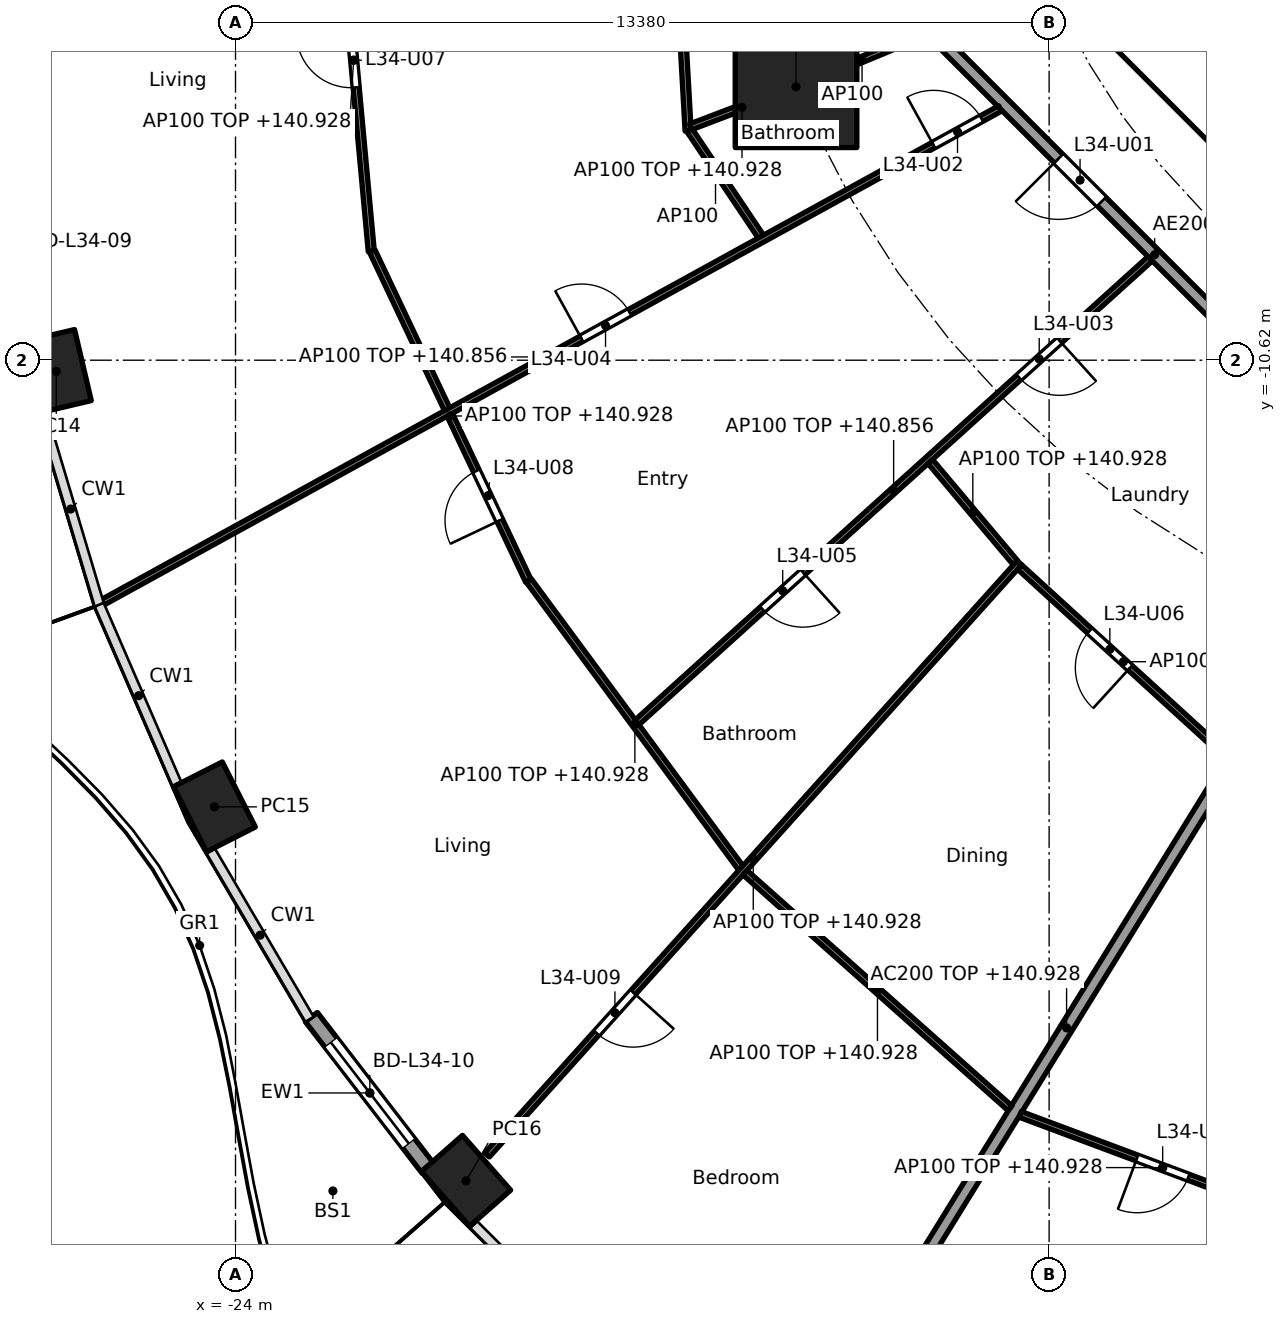
"""IFC4 building model, lengths in metres.
Left out: names, types, materials, properties, quantities, classifications, styles, units other than length and angle.
Written with IfcOpenShell. Run it as: python <this file> out.ifc"""

import sys

from ifc_helpers import new_model, si_unit, direction, frame, frame_2d, origin, origin_2d, place, context, subcontext, project, spatial, rectangle, hollow_rectangle, extrude, element, fill, save


model = new_model("IFC4")
c1 = context("Model", 3, precision=1e-05, world=origin(), true_north=direction((0.0, 1.0)))
c2 = subcontext(c1, "Body", "Model", "MODEL_VIEW")
j1 = project(units=[si_unit("LENGTHUNIT", "METRE"), si_unit("PLANEANGLEUNIT", "RADIAN")], contexts=[c1])
p1 = place(None, origin())
s1 = spatial("IfcSite", under=j1, at=p1, CompositionType="ELEMENT")
p2 = place(p1, origin())
s2 = spatial("IfcBuilding", under=s1, at=p2, CompositionType="ELEMENT")
p3 = place(p2, frame((0.0, 0.0, 138.1)))
s3 = spatial("IfcBuildingStorey", under=s2, at=p3, CompositionType="ELEMENT", Elevation=138.1)
for number, where, z_axis, x_axis in (
    (1, (-26.948, -10.803, 0.0), (0.0, 0.0, 1.0), (0.229, -0.973, 0.0)),
    (2, (-24.347, -17.965, 0.0), (0.0, 0.0, 1.0), (0.452, -0.892, 0.0)),
    (3, (-20.209, -24.115, 0.0), (0.0, 0.0, 1.0), (0.66, -0.751, 0.0)),
):
    element("IfcColumn", number, at=place(p3, frame(where, z_axis=z_axis, x_axis=x_axis)), inside=s3, PredefinedType="COLUMN", context=c2, shape_type="SweptSolid", body=[
        extrude(hollow_rectangle(XDim=1.2, YDim=0.9, WallThickness=0.04, at=origin_2d()), origin(), (0.0, 0.0, 1.0), 3.7),
    ])
p4 = place(p3, frame((-14.782, -6.123, 0.0), z_axis=(0.0, 0.0, 1.0), x_axis=(1.0, 0.0, 0.0)))
e4 = element("IfcColumn", 4, at=p4, inside=s3, PredefinedType="COLUMN", context=c2, shape_type="SweptSolid", body=[
    extrude(rectangle(XDim=2.0, YDim=2.0, at=origin_2d()), origin(), (0.0, 0.0, 1.0), 3.7),
])
p5 = place(p3, frame((-20.83, -23.917, 0.0), z_axis=(0.0, 0.0, 1.0), x_axis=(-0.610429847179, 0.792070326217, 0.0)))
e5 = element("IfcWall", 5, at=p5, inside=s3, PredefinedType="SOLIDWALL", context=c2, shape_type="SweptSolid", body=[
    extrude(rectangle(XDim=3.149, YDim=0.25, at=frame_2d((1.575, 0.0))), origin(), (0.0, 0.0, 1.0), 3.44),
])
p6 = place(p5, frame((0.525, 0.0, 0.0)))
e6 = element("IfcOpeningElement", 6, at=p6, cuts=e5, PredefinedType="OPENING", context=c2, shape_type="SweptSolid", body=[
    extrude(rectangle(XDim=2.1, YDim=2.4, at=frame_2d((1.05, 1.2))), frame((0.0, 0.135, 0.0), z_axis=(0.0, -1.0, 0.0), x_axis=(1.0, 0.0, 0.0)), (0.0, 0.0, 1.0), 0.27),
])
p7 = place(p3, frame((-9.988, -4.613, 0.0), z_axis=(0.0, 0.0, 1.0), x_axis=(0.707106781187, -0.707106781187, 0.0)))
e7 = element("IfcWall", 7, at=p7, inside=s3, PredefinedType="SHEAR", context=c2, shape_type="SweptSolid", body=[
    extrude(rectangle(XDim=7.602, YDim=0.6, at=frame_2d((3.801, 0.0))), origin(), (0.0, 0.0, 1.0), 3.44),
])
p8 = place(p7, frame((6.151, 0.0, 0.0)))
e8 = element("IfcOpeningElement", 8, at=p8, cuts=e7, PredefinedType="OPENING", context=c2, shape_type="SweptSolid", body=[
    extrude(rectangle(XDim=1.1, YDim=2.1, at=frame_2d((0.55, 1.05))), frame((0.0, 0.31, 0.0), z_axis=(0.0, -1.0, 0.0), x_axis=(1.0, 0.0, 0.0)), (0.0, 0.0, 1.0), 0.62),
])
p9 = place(p3, frame((-6.149, -14.825, 0.0), z_axis=(0.0, 0.0, 1.0), x_axis=(-0.525406383516, -0.85085141603, 0.0)))
e9 = element("IfcWall", 9, at=p9, inside=s3, PredefinedType="PARTITIONING", context=c2, shape_type="SweptSolid", body=[
    extrude(rectangle(XDim=15.925, YDim=0.2, at=frame_2d((7.962, 0.0))), origin(), (0.0, 0.0, 1.0), 2.828),
])
p10 = place(p3, frame((-12.635, -5.134, 0.0), z_axis=(0.0, 0.0, 1.0), x_axis=(0.707106781187, -0.707106781187, 0.0)))
e10 = element("IfcWall", 10, at=p10, inside=s3, PredefinedType="PARTITIONING", context=c2, shape_type="SweptSolid", body=[
    extrude(rectangle(XDim=10.609, YDim=0.2, at=frame_2d((5.305, 0.0))), origin(), (0.0, 0.0, 1.0), 3.44),
])
p11 = place(p10, frame((3.07, 0.0, 0.0)))
e11 = element("IfcOpeningElement", 11, at=p11, cuts=e10, PredefinedType="OPENING", context=c2, shape_type="SweptSolid", body=[
    extrude(rectangle(XDim=1.0, YDim=2.1, at=frame_2d((0.5, 1.05))), frame((0.0, 0.11, 0.0), z_axis=(0.0, -1.0, 0.0), x_axis=(1.0, 0.0, 0.0)), (0.0, 0.0, 1.0), 0.22),
])
p12 = place(p3, frame((-16.825, -2.058, 0.0), z_axis=(0.0, 0.0, 1.0), x_axis=(0.055971643802, -0.998432358796, 0.0)))
e12 = element("IfcWall", 12, at=p12, inside=s3, PredefinedType="PARTITIONING", context=c2, shape_type="SweptSolid", body=[
    extrude(rectangle(XDim=4.798, YDim=0.1, at=frame_2d((2.399, 0.0))), origin(), (0.0, 0.0, 1.0), 2.828),
])
p13 = place(p3, frame((-22.347, -2.542, 0.0), z_axis=(0.0, 0.0, 1.0), x_axis=(0.091783634244, -0.995778973711, 0.0)))
e13 = element("IfcWall", 13, at=p13, inside=s3, PredefinedType="PARTITIONING", context=c2, shape_type="SweptSolid", body=[
    extrude(rectangle(XDim=6.315, YDim=0.1, at=frame_2d((3.157, 0.0))), origin(), (0.0, 0.0, 1.0), 2.828),
])
p14 = place(p13, frame((2.708, 0.0, 0.0)))
e14 = element("IfcOpeningElement", 14, at=p14, cuts=e13, PredefinedType="OPENING", context=c2, shape_type="SweptSolid", body=[
    extrude(rectangle(XDim=0.9, YDim=2.1, at=frame_2d((0.45, 1.05))), frame((0.0, 0.06, 0.0), z_axis=(0.0, -1.0, 0.0), x_axis=(1.0, 0.0, 0.0)), (0.0, 0.0, 1.0), 0.12),
])
p15 = place(p3, frame((-12.657, -5.243, 0.0), z_axis=(0.0, 0.0, 1.0), x_axis=(-0.923864733477, -0.382719158442, 0.0)))
e15 = element("IfcWall", 15, at=p15, inside=s3, PredefinedType="PARTITIONING", context=c2, shape_type="SweptSolid", body=[
    extrude(rectangle(XDim=2.25, YDim=0.1, at=frame_2d((1.125, 0.0))), origin(), (0.0, 0.0, 1.0), 3.44),
])
p16 = place(p3, frame((-14.829, -6.141, 0.0), z_axis=(0.0, 0.0, 1.0), x_axis=(-0.934704367514, -0.355426146128, 0.0)))
e16 = element("IfcWall", 16, at=p16, inside=s3, PredefinedType="PARTITIONING", context=c2, shape_type="SweptSolid", body=[
    extrude(rectangle(XDim=1.802, YDim=0.1, at=frame_2d((0.901, 0.0))), origin(), (0.0, 0.0, 1.0), 2.828),
])
p17 = place(p3, frame((-16.532, -6.84, 0.0), z_axis=(0.0, 0.0, 1.0), x_axis=(0.556994773624, -0.830515997531, 0.0)))
e17 = element("IfcWall", 17, at=p17, inside=s3, PredefinedType="PARTITIONING", context=c2, shape_type="SweptSolid", body=[
    extrude(rectangle(XDim=2.183, YDim=0.1, at=frame_2d((1.092, 0.0))), origin(), (0.0, 0.0, 1.0), 3.44),
])
p18 = place(p3, frame((-21.75, -8.826, 0.0), z_axis=(0.0, 0.0, 1.0), x_axis=(0.427736419988, -0.903903509793, 0.0)))
e18 = element("IfcWall", 18, at=p18, inside=s3, PredefinedType="PARTITIONING", context=c2, shape_type="SweptSolid", body=[
    extrude(rectangle(XDim=5.999, YDim=0.1, at=frame_2d((3.0, 0.0))), origin(), (0.0, 0.0, 1.0), 2.828),
])
p19 = place(p18, frame((3.999, 0.0, 0.0)))
e19 = element("IfcOpeningElement", 19, at=p19, cuts=e18, PredefinedType="OPENING", context=c2, shape_type="SweptSolid", body=[
    extrude(rectangle(XDim=0.9, YDim=2.1, at=frame_2d((0.45, 1.05))), frame((0.0, 0.06, 0.0), z_axis=(0.0, -1.0, 0.0), x_axis=(1.0, 0.0, 0.0)), (0.0, 0.0, 1.0), 0.12),
])
p20 = place(p3, frame((-11.426, -6.479, 0.0), z_axis=(0.0, 0.0, 1.0), x_axis=(-0.876110392495, -0.482110547657, 0.0)))
e20 = element("IfcWall", 20, at=p20, inside=s3, PredefinedType="PARTITIONING", context=c2, shape_type="SweptSolid", body=[
    extrude(rectangle(XDim=16.955, YDim=0.1, at=frame_2d((8.478, 0.0))), origin(), (0.0, 0.0, 1.0), 2.756),
])
p21 = place(p20, frame((0.35, 0.0, 0.0)))
e21 = element("IfcOpeningElement", 21, at=p21, cuts=e20, PredefinedType="OPENING", context=c2, shape_type="SweptSolid", body=[
    extrude(rectangle(XDim=0.9, YDim=2.1, at=frame_2d((0.45, 1.05))), frame((0.0, 0.06, 0.0), z_axis=(0.0, -1.0, 0.0), x_axis=(1.0, 0.0, 0.0)), (0.0, 0.0, 1.0), 0.12),
])
p22 = place(p20, frame((6.957, 0.0, 0.0)))
e22 = element("IfcOpeningElement", 22, at=p22, cuts=e20, PredefinedType="OPENING", context=c2, shape_type="SweptSolid", body=[
    extrude(rectangle(XDim=0.9, YDim=2.1, at=frame_2d((0.45, 1.05))), frame((0.0, 0.06, 0.0), z_axis=(0.0, -1.0, 0.0), x_axis=(1.0, 0.0, 0.0)), (0.0, 0.0, 1.0), 0.12),
])
p23 = place(p3, frame((-19.176, -14.244, 0.0), z_axis=(0.0, 0.0, 1.0), x_axis=(0.593532053206, -0.80481035146, 0.0)))
e23 = element("IfcWall", 23, at=p23, inside=s3, PredefinedType="PARTITIONING", context=c2, shape_type="SweptSolid", body=[
    extrude(rectangle(XDim=5.876, YDim=0.1, at=frame_2d((2.938, 0.0))), origin(), (0.0, 0.0, 1.0), 2.828),
])
p24 = place(p3, frame((-8.959, -8.952, 0.0), z_axis=(0.0, 0.0, 1.0), x_axis=(-0.741982736283, -0.670418987692, 0.0)))
e24 = element("IfcWall", 24, at=p24, inside=s3, PredefinedType="PARTITIONING", context=c2, shape_type="SweptSolid", body=[
    extrude(rectangle(XDim=11.371, YDim=0.1, at=frame_2d((5.685, 0.0))), origin(), (0.0, 0.0, 1.0), 2.756),
])
p25 = place(p24, frame((2.009, 0.0, 0.0)))
e25 = element("IfcOpeningElement", 25, at=p25, cuts=e24, PredefinedType="OPENING", context=c2, shape_type="SweptSolid", body=[
    extrude(rectangle(XDim=0.9, YDim=2.1, at=frame_2d((0.45, 1.05))), frame((0.0, 0.06, 0.0), z_axis=(0.0, -1.0, 0.0), x_axis=(1.0, 0.0, 0.0)), (0.0, 0.0, 1.0), 0.12),
])
p26 = place(p24, frame((7.694, 0.0, 0.0)))
e26 = element("IfcOpeningElement", 26, at=p26, cuts=e24, PredefinedType="OPENING", context=c2, shape_type="SweptSolid", body=[
    extrude(rectangle(XDim=0.9, YDim=2.1, at=frame_2d((0.45, 1.05))), frame((0.0, 0.06, 0.0), z_axis=(0.0, -1.0, 0.0), x_axis=(1.0, 0.0, 0.0)), (0.0, 0.0, 1.0), 0.12),
])
p27 = place(p3, frame((-12.575, -12.286, 0.0), z_axis=(0.0, 0.0, 1.0), x_axis=(0.644052758448, -0.764981074495, 0.0)))
e27 = element("IfcWall", 27, at=p27, inside=s3, PredefinedType="PARTITIONING", context=c2, shape_type="SweptSolid", body=[
    extrude(rectangle(XDim=2.174, YDim=0.1, at=frame_2d((1.087, 0.0))), origin(), (0.0, 0.0, 1.0), 2.828),
])
p28 = place(p3, frame((-11.109, -13.951, 0.0), z_axis=(0.0, 0.0, 1.0), x_axis=(-0.668488676691, -0.743722319913, 0.0)))
e28 = element("IfcWall", 28, at=p28, inside=s3, PredefinedType="PARTITIONING", context=c2, shape_type="SweptSolid", body=[
    extrude(rectangle(XDim=13.094, YDim=0.1, at=frame_2d((6.547, 0.0))), origin(), (0.0, 0.0, 1.0), 2.828),
])
p29 = place(p28, frame((9.5, 0.0, 0.0)))
e29 = element("IfcOpeningElement", 29, at=p29, cuts=e28, PredefinedType="OPENING", context=c2, shape_type="SweptSolid", body=[
    extrude(rectangle(XDim=0.9, YDim=2.1, at=frame_2d((0.45, 1.05))), frame((0.0, 0.06, 0.0), z_axis=(0.0, -1.0, 0.0), x_axis=(1.0, 0.0, 0.0)), (0.0, 0.0, 1.0), 0.12),
])
p30 = place(p3, frame((-11.105, -14.021, 0.0), z_axis=(0.0, 0.0, 1.0), x_axis=(0.738880014758, -0.673837015747, 0.0)))
e30 = element("IfcWall", 30, at=p30, inside=s3, PredefinedType="PARTITIONING", context=c2, shape_type="SweptSolid", body=[
    extrude(rectangle(XDim=4.621, YDim=0.1, at=frame_2d((2.31, 0.0))), origin(), (0.0, 0.0, 1.0), 2.828),
])
p31 = place(p30, frame((1.558, 0.0, 0.0)))
e31 = element("IfcOpeningElement", 31, at=p31, cuts=e30, PredefinedType="OPENING", context=c2, shape_type="SweptSolid", body=[
    extrude(rectangle(XDim=0.9, YDim=2.1, at=frame_2d((0.45, 1.05))), frame((0.0, 0.06, 0.0), z_axis=(0.0, -1.0, 0.0), x_axis=(1.0, 0.0, 0.0)), (0.0, 0.0, 1.0), 0.12),
])
p32 = place(p3, frame((-15.622, -19.046, 0.0), z_axis=(0.0, 0.0, 1.0), x_axis=(0.747342322463, -0.664439201925, 0.0)))
e32 = element("IfcWall", 32, at=p32, inside=s3, PredefinedType="PARTITIONING", context=c2, shape_type="SweptSolid", body=[
    extrude(rectangle(XDim=5.831, YDim=0.1, at=frame_2d((2.916, 0.0))), origin(), (0.0, 0.0, 1.0), 2.828),
])
p33 = place(p3, frame((-11.096, -23.022, 0.0), z_axis=(0.0, 0.0, 1.0), x_axis=(0.936725688471, -0.350064257758, 0.0)))
e33 = element("IfcWall", 33, at=p33, inside=s3, PredefinedType="PARTITIONING", context=c2, shape_type="SweptSolid", body=[
    extrude(rectangle(XDim=5.003, YDim=0.1, at=frame_2d((2.501, 0.0))), origin(), (0.0, 0.0, 1.0), 2.828),
])
p34 = place(p33, frame((2.051, 0.0, 0.0)))
e34 = element("IfcOpeningElement", 34, at=p34, cuts=e33, PredefinedType="OPENING", context=c2, shape_type="SweptSolid", body=[
    extrude(rectangle(XDim=0.9, YDim=2.1, at=frame_2d((0.45, 1.05))), frame((0.0, 0.06, 0.0), z_axis=(0.0, -1.0, 0.0), x_axis=(1.0, 0.0, 0.0)), (0.0, 0.0, 1.0), 0.12),
])
p35 = place(p6, origin())
e35 = element("IfcDoor", 35, at=p35, inside=s3, OperationType="SLIDING_TO_LEFT", PredefinedType="DOOR", context=c2, shape_type="SweptSolid", body=[
    extrude(rectangle(XDim=2.1, YDim=2.4, at=frame_2d((1.05, 1.2))), frame((0.0, 0.025, 0.0), z_axis=(0.0, -1.0, 0.0), x_axis=(1.0, 0.0, 0.0)), (0.0, 0.0, 1.0), 0.05),
])
fill(e6, e35)
p36 = place(p11, frame((1.0, 0.0, 0.0), x_axis=(-1.0, 0.0, 0.0)))
e36 = element("IfcDoor", 36, at=p36, inside=s3, OperationType="SINGLE_SWING_RIGHT", PredefinedType="DOOR", context=c2, shape_type="SweptSolid", body=[
    extrude(rectangle(XDim=1.0, YDim=2.1, at=frame_2d((0.5, 1.05))), frame((0.0, 0.025, 0.0), z_axis=(0.0, -1.0, 0.0), x_axis=(1.0, 0.0, 0.0)), (0.0, 0.0, 1.0), 0.05),
])
fill(e11, e36)
p37 = place(p21, frame((0.9, 0.0, 0.0), x_axis=(-1.0, 0.0, 0.0)))
e37 = element("IfcDoor", 37, at=p37, inside=s3, OperationType="SINGLE_SWING_LEFT", PredefinedType="DOOR", context=c2, shape_type="SweptSolid", body=[
    extrude(rectangle(XDim=0.9, YDim=2.1, at=frame_2d((0.45, 1.05))), frame((0.0, 0.025, 0.0), z_axis=(0.0, -1.0, 0.0), x_axis=(1.0, 0.0, 0.0)), (0.0, 0.0, 1.0), 0.05),
])
fill(e21, e37)
p38 = place(p25, origin())
e38 = element("IfcDoor", 38, at=p38, inside=s3, OperationType="SINGLE_SWING_LEFT", PredefinedType="DOOR", context=c2, shape_type="SweptSolid", body=[
    extrude(rectangle(XDim=0.9, YDim=2.1, at=frame_2d((0.45, 1.05))), frame((0.0, 0.025, 0.0), z_axis=(0.0, -1.0, 0.0), x_axis=(1.0, 0.0, 0.0)), (0.0, 0.0, 1.0), 0.05),
])
fill(e25, e38)
p39 = place(p22, frame((0.9, 0.0, 0.0), x_axis=(-1.0, 0.0, 0.0)))
e39 = element("IfcDoor", 39, at=p39, inside=s3, OperationType="SINGLE_SWING_LEFT", PredefinedType="DOOR", context=c2, shape_type="SweptSolid", body=[
    extrude(rectangle(XDim=0.9, YDim=2.1, at=frame_2d((0.45, 1.05))), frame((0.0, 0.025, 0.0), z_axis=(0.0, -1.0, 0.0), x_axis=(1.0, 0.0, 0.0)), (0.0, 0.0, 1.0), 0.05),
])
fill(e22, e39)
p40 = place(p26, origin())
e40 = element("IfcDoor", 40, at=p40, inside=s3, OperationType="SINGLE_SWING_LEFT", PredefinedType="DOOR", context=c2, shape_type="SweptSolid", body=[
    extrude(rectangle(XDim=0.9, YDim=2.1, at=frame_2d((0.45, 1.05))), frame((0.0, 0.025, 0.0), z_axis=(0.0, -1.0, 0.0), x_axis=(1.0, 0.0, 0.0)), (0.0, 0.0, 1.0), 0.05),
])
fill(e26, e40)
p41 = place(p31, frame((0.9, 0.0, 0.0), x_axis=(-1.0, 0.0, 0.0)))
e41 = element("IfcDoor", 41, at=p41, inside=s3, OperationType="SINGLE_SWING_LEFT", PredefinedType="DOOR", context=c2, shape_type="SweptSolid", body=[
    extrude(rectangle(XDim=0.9, YDim=2.1, at=frame_2d((0.45, 1.05))), frame((0.0, 0.025, 0.0), z_axis=(0.0, -1.0, 0.0), x_axis=(1.0, 0.0, 0.0)), (0.0, 0.0, 1.0), 0.05),
])
fill(e31, e41)
p42 = place(p14, frame((0.9, 0.0, 0.0), x_axis=(-1.0, 0.0, 0.0)))
e42 = element("IfcDoor", 42, at=p42, inside=s3, OperationType="SINGLE_SWING_RIGHT", PredefinedType="DOOR", context=c2, shape_type="SweptSolid", body=[
    extrude(rectangle(XDim=0.9, YDim=2.1, at=frame_2d((0.45, 1.05))), frame((0.0, 0.025, 0.0), z_axis=(0.0, -1.0, 0.0), x_axis=(1.0, 0.0, 0.0)), (0.0, 0.0, 1.0), 0.05),
])
fill(e14, e42)
p43 = place(p19, frame((0.9, 0.0, 0.0), x_axis=(-1.0, 0.0, 0.0)))
e43 = element("IfcDoor", 43, at=p43, inside=s3, OperationType="SINGLE_SWING_LEFT", PredefinedType="DOOR", context=c2, shape_type="SweptSolid", body=[
    extrude(rectangle(XDim=0.9, YDim=2.1, at=frame_2d((0.45, 1.05))), frame((0.0, 0.025, 0.0), z_axis=(0.0, -1.0, 0.0), x_axis=(1.0, 0.0, 0.0)), (0.0, 0.0, 1.0), 0.05),
])
fill(e19, e43)
p44 = place(p29, origin())
e44 = element("IfcDoor", 44, at=p44, inside=s3, OperationType="SINGLE_SWING_LEFT", PredefinedType="DOOR", context=c2, shape_type="SweptSolid", body=[
    extrude(rectangle(XDim=0.9, YDim=2.1, at=frame_2d((0.45, 1.05))), frame((0.0, 0.025, 0.0), z_axis=(0.0, -1.0, 0.0), x_axis=(1.0, 0.0, 0.0)), (0.0, 0.0, 1.0), 0.05),
])
fill(e29, e44)
p45 = place(p34, frame((0.9, 0.0, 0.0), x_axis=(-1.0, 0.0, 0.0)))
e45 = element("IfcDoor", 45, at=p45, inside=s3, OperationType="SINGLE_SWING_RIGHT", PredefinedType="DOOR", context=c2, shape_type="SweptSolid", body=[
    extrude(rectangle(XDim=0.9, YDim=2.1, at=frame_2d((0.45, 1.05))), frame((0.0, 0.025, 0.0), z_axis=(0.0, -1.0, 0.0), x_axis=(1.0, 0.0, 0.0)), (0.0, 0.0, 1.0), 0.05),
])
fill(e34, e45)
save(model, sys.argv[1])
